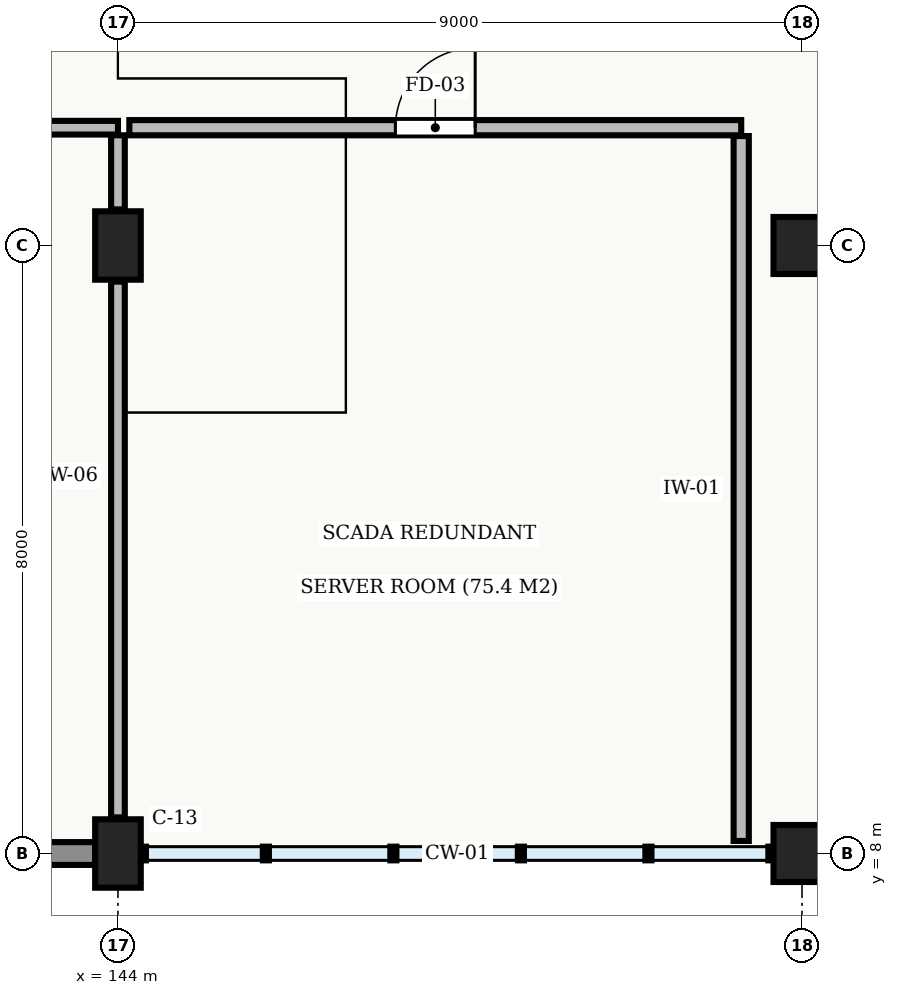
"""IFC4 building model, lengths in metres.
Left out: names, types, materials, properties, quantities, classifications, styles, units other than length and angle.
Written with IfcOpenShell. Run it as: python <this file> out.ifc"""

import sys

from ifc_helpers import new_model, si_unit, direction, frame, frame_2d, origin, origin_2d, place, context, subcontext, project, spatial, rectangle, extrude, element, fill, save


model = new_model("IFC4")
c1 = context("Model", 3, precision=1e-05, world=origin(), true_north=direction((0.0, 1.0)))
c2 = subcontext(c1, "Body", "Model", "MODEL_VIEW")
j1 = project(units=[si_unit("LENGTHUNIT", "METRE"), si_unit("PLANEANGLEUNIT", "RADIAN")], contexts=[c1])
p1 = place(None, origin())
s1 = spatial("IfcSite", under=j1, at=p1, CompositionType="ELEMENT")
p2 = place(p1, origin())
s2 = spatial("IfcBuilding", under=s1, at=p2, CompositionType="ELEMENT")
p3 = place(p2, frame((0.0, 0.0, 14.4)))
s3 = spatial("IfcBuildingStorey", under=s2, at=p3, CompositionType="ELEMENT", Elevation=14.4)
for number, where, z_axis, x_axis in (
    (1, (144.0, 8.0, 0.0), (0.0, 0.0, 1.0), (1.0, 0.0, 0.0)),
    (2, (144.0, 16.0, 0.0), (0.0, 0.0, 1.0), (1.0, 0.0, 0.0)),
):
    element("IfcColumn", number, at=place(p3, frame(where, z_axis=z_axis, x_axis=x_axis)), inside=s3, PredefinedType="COLUMN", context=c2, shape_type="SweptSolid", body=[
        extrude(rectangle(XDim=0.6, YDim=0.9, at=origin_2d()), origin(), (0.0, 0.0, 1.0), 4.2),
    ])
for number, where, z_axis, x_axis in (
    (3, (153.0, 8.0, 0.0), (0.0, 0.0, 1.0), (1.0, 0.0, 0.0)),
    (4, (153.0, 16.0, 0.0), (0.0, 0.0, 1.0), (1.0, 0.0, 0.0)),
):
    element("IfcColumn", number, at=place(p3, frame(where, z_axis=z_axis, x_axis=x_axis)), inside=s3, PredefinedType="COLUMN", context=c2, shape_type="SweptSolid", body=[
        extrude(rectangle(XDim=0.75, YDim=0.75, at=origin_2d()), origin(), (0.0, 0.0, 1.0), 4.2),
    ])
p4 = place(p3, frame((143.702, 8.0, 0.0), z_axis=(0.0, 0.0, 1.0), x_axis=(-1.0, 0.0, 0.0)))
e5 = element("IfcWall", 5, at=p4, inside=s3, PredefinedType="STANDARD", context=c2, shape_type="SweptSolid", body=[
    extrude(rectangle(XDim=8.354, YDim=0.3, at=frame_2d((4.177, 0.0))), origin(), (0.0, 0.0, 1.0), 3.44),
])
p5 = place(p4, frame((1.051, 0.0, 0.9)))
e6 = element("IfcOpeningElement", 6, at=p5, cuts=e5, PredefinedType="OPENING", context=c2, shape_type="SweptSolid", body=[
    extrude(rectangle(XDim=2.6, YDim=1.6, at=frame_2d((1.3, 0.8))), frame((0.0, 0.162, 0.0), z_axis=(0.0, -1.0, 0.0), x_axis=(1.0, 0.0, 0.0)), (0.0, 0.0, 1.0), 0.324),
])
p6 = place(p4, frame((4.703, 0.0, 0.9)))
e7 = element("IfcOpeningElement", 7, at=p6, cuts=e5, PredefinedType="OPENING", context=c2, shape_type="SweptSolid", body=[
    extrude(rectangle(XDim=2.6, YDim=1.6, at=frame_2d((1.3, 0.8))), frame((0.0, 0.162, 0.0), z_axis=(0.0, -1.0, 0.0), x_axis=(1.0, 0.0, 0.0)), (0.0, 0.0, 1.0), 0.324),
])
p7 = place(p3, frame((108.165, 17.55, 0.0), z_axis=(0.0, 0.0, 1.0), x_axis=(1.0, 0.0, 0.0)))
e8 = element("IfcWall", 8, at=p7, inside=s3, PredefinedType="STANDARD", context=c2, shape_type="SweptSolid", body=[
    extrude(rectangle(XDim=35.835, YDim=0.18, at=frame_2d((17.917, 0.0))), origin(), (0.0, 0.0, 1.0), 3.9),
])
p8 = place(p7, frame((15.782, 0.0, 0.0)))
e9 = element("IfcOpeningElement", 9, at=p8, cuts=e8, PredefinedType="OPENING", context=c2, shape_type="SweptSolid", body=[
    extrude(rectangle(XDim=1.15, YDim=2.15, at=frame_2d((0.575, 1.075))), frame((0.0, 0.102, 0.0), z_axis=(0.0, -1.0, 0.0), x_axis=(1.0, 0.0, 0.0)), (0.0, 0.0, 1.0), 0.204),
])
p9 = place(p3, frame((144.0, 8.475, 0.0), z_axis=(0.0, 0.0, 1.0), x_axis=(0.0, 1.0, 0.0)))
e10 = element("IfcWall", 10, at=p9, inside=s3, PredefinedType="STANDARD", context=c2, shape_type="SweptSolid", body=[
    extrude(rectangle(XDim=7.05, YDim=0.18, at=frame_2d((3.525, 0.0))), origin(), (0.0, 0.0, 1.0), 3.33),
])
p10 = place(p3, frame((144.0, 16.475, 0.0), z_axis=(0.0, 0.0, 1.0), x_axis=(0.0, 1.0, 0.0)))
e11 = element("IfcWall", 11, at=p10, inside=s3, PredefinedType="STANDARD", context=c2, shape_type="SweptSolid", body=[
    extrude(rectangle(XDim=0.975, YDim=0.18, at=frame_2d((0.487, 0.0))), origin(), (0.0, 0.0, 1.0), 3.33),
])
p11 = place(p3, frame((144.15, 17.55, 0.0), z_axis=(0.0, 0.0, 1.0), x_axis=(1.0, 0.0, 0.0)))
e12 = element("IfcWall", 12, at=p11, inside=s3, PredefinedType="STANDARD", context=c2, shape_type="SweptSolid", body=[
    extrude(rectangle(XDim=8.05, YDim=0.2, at=frame_2d((4.025, 0.0))), origin(), (0.0, 0.0, 1.0), 3.9),
])
p12 = place(p11, frame((3.5, 0.0, 0.0)))
e13 = element("IfcOpeningElement", 13, at=p12, cuts=e12, PredefinedType="OPENING", context=c2, shape_type="SweptSolid", body=[
    extrude(rectangle(XDim=1.05, YDim=2.15, at=frame_2d((0.525, 1.075))), frame((0.0, 0.112, 0.0), z_axis=(0.0, -1.0, 0.0), x_axis=(1.0, 0.0, 0.0)), (0.0, 0.0, 1.0), 0.224),
])
p13 = place(p3, frame((152.2, 8.165, 0.0), z_axis=(0.0, 0.0, 1.0), x_axis=(0.0, 1.0, 0.0)))
e14 = element("IfcWall", 14, at=p13, inside=s3, PredefinedType="STANDARD", context=c2, shape_type="SweptSolid", body=[
    extrude(rectangle(XDim=9.275, YDim=0.2, at=frame_2d((4.637, 0.0))), origin(), (0.0, 0.0, 1.0), 3.9),
])
p14 = place(p12, origin())
e15 = element("IfcDoor", 15, at=p14, inside=s3, OperationType="SINGLE_SWING_RIGHT", PredefinedType="DOOR", context=c2, shape_type="SweptSolid", body=[
    extrude(rectangle(XDim=1.05, YDim=2.15, at=frame_2d((0.525, 1.075))), frame((0.0, 0.025, 0.0), z_axis=(0.0, -1.0, 0.0), x_axis=(1.0, 0.0, 0.0)), (0.0, 0.0, 1.0), 0.05),
])
fill(e13, e15)
save(model, sys.argv[1])
